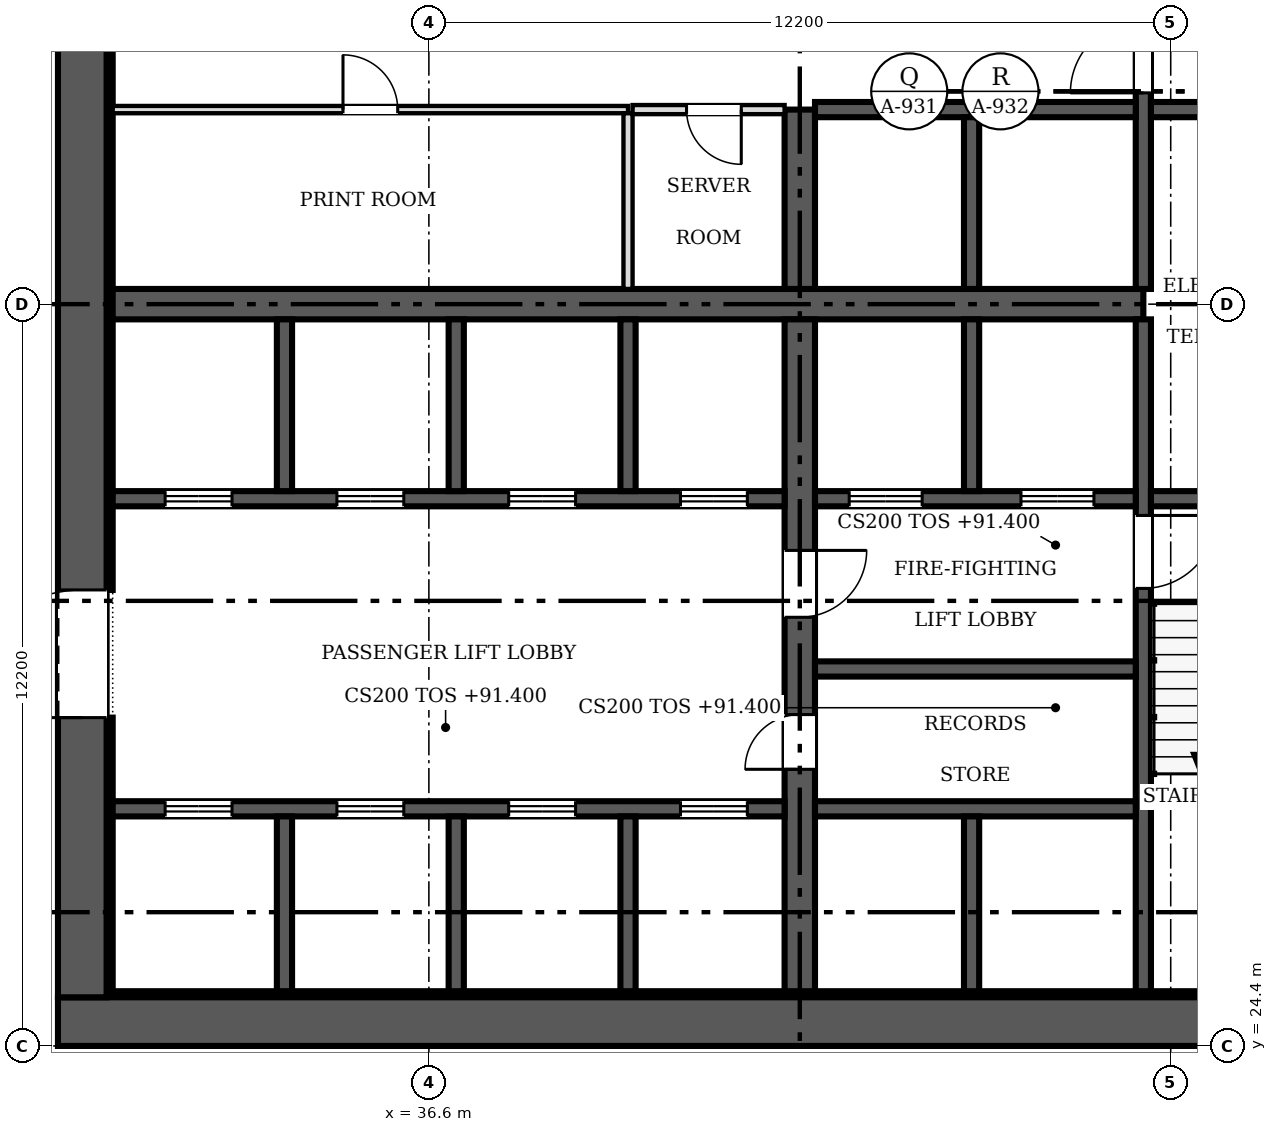
"""IFC4 building model, lengths in metres.
Left out: names, types, materials, properties, quantities, classifications, styles, units other than length and angle.
Written with IfcOpenShell. Run it as: python <this file> out.ifc"""

import sys

from ifc_helpers import new_model, si_unit, direction, frame, frame_2d, origin, place, context, subcontext, project, spatial, rectangle, extrude, source, transform, mapped, element, fill, save


model = new_model("IFC4")
c1 = context("Model", 3, precision=1e-05, world=origin(), true_north=direction((0.0, 1.0)))
c2 = subcontext(c1, "Body", "Model", "MODEL_VIEW")
j1 = project(units=[si_unit("LENGTHUNIT", "METRE"), si_unit("PLANEANGLEUNIT", "RADIAN")], contexts=[c1])
p1 = place(None, origin())
s1 = spatial("IfcSite", under=j1, at=p1, CompositionType="ELEMENT")
p2 = place(p1, origin())
s2 = spatial("IfcBuilding", under=s1, at=p2, CompositionType="ELEMENT")
p3 = place(p2, frame((0.0, 0.0, 91.4)))
s3 = spatial("IfcBuildingStorey", under=s2, at=p3, CompositionType="ELEMENT", Elevation=91.4)
p4 = place(p3, frame((54.9, 24.8, 0.0), z_axis=(0.0, 0.0, 1.0), x_axis=(-1.0, 0.0, 0.0)))
e1 = element("IfcWall", 1, at=p4, inside=s3, PredefinedType="SHEAR", context=c2, shape_type="SweptSolid", body=[
    extrude(rectangle(XDim=24.4, YDim=0.8, at=frame_2d((12.2, 0.0))), origin(), (0.0, 0.0, 1.0), 3.8),
])
m1 = source(origin(), c2, "Body", "SweptSolid", [
    extrude(rectangle(XDim=1.2, YDim=2.1, at=frame_2d((0.6, 1.05))), frame((0.0, 0.41, 0.0), z_axis=(0.0, -1.0, 0.0), x_axis=(1.0, 0.0, 0.0)), (0.0, 0.0, 1.0), 0.82),
])
p5 = place(p4, frame((1.5, 0.0, 0.0)))
e2 = element("IfcOpeningElement", 2, at=p5, cuts=e1, PredefinedType="OPENING", context=c2, shape_type="MappedRepresentation", body=[
    mapped(m1, transform((0.0, 0.0, 0.0), scale=1.0)),
])
p6 = place(p3, frame((30.9, 25.2, 0.0), z_axis=(0.0, 0.0, 1.0), x_axis=(0.0, 1.0, 0.0)))
e3 = element("IfcWall", 3, at=p6, inside=s3, PredefinedType="SHEAR", context=c2, shape_type="SweptSolid", body=[
    extrude(rectangle(XDim=22.8, YDim=0.8, at=frame_2d((11.4, 0.0))), origin(), (0.0, 0.0, 1.0), 3.8),
])
m2 = source(origin(), c2, "Body", "SweptSolid", [
    extrude(rectangle(XDim=2.1, YDim=2.4, at=frame_2d((1.05, 1.2))), frame((0.0, 0.41, 0.0), z_axis=(0.0, -1.0, 0.0), x_axis=(1.0, 0.0, 0.0)), (0.0, 0.0, 1.0), 0.82),
])
p7 = place(p6, frame((4.6, 0.0, 0.0)))
e4 = element("IfcOpeningElement", 4, at=p7, cuts=e3, PredefinedType="OPENING", context=c2, shape_type="MappedRepresentation", body=[
    mapped(m2, transform((0.0, 0.0, 0.0), scale=1.0)),
])
p8 = place(p6, frame((16.1, 0.0, 0.0)))
e5 = element("IfcOpeningElement", 5, at=p8, cuts=e3, PredefinedType="OPENING", context=c2, shape_type="MappedRepresentation", body=[
    mapped(m2, transform((0.0, 0.0, 0.0), scale=1.0)),
])
p9 = place(p3, frame((31.3, 25.25, 0.0), z_axis=(0.0, 0.0, 1.0), x_axis=(1.0, 0.0, 0.0)))
e6 = element("IfcWall", 6, at=p9, inside=s3, PredefinedType="SOLIDWALL", context=c2, shape_type="SweptSolid", body=[
    extrude(rectangle(XDim=20.9, YDim=0.1, at=frame_2d((10.45, 0.0))), origin(), (0.0, 0.0, 1.0), 3.8),
])
p10 = place(p3, frame((31.35, 25.3, 0.0), z_axis=(0.0, 0.0, 1.0), x_axis=(0.0, 1.0, 0.0)))
e7 = element("IfcWall", 7, at=p10, inside=s3, PredefinedType="SOLIDWALL", context=c2, shape_type="SweptSolid", body=[
    extrude(rectangle(XDim=4.5, YDim=0.1, at=frame_2d((2.25, 0.0))), origin(), (0.0, 0.0, 1.0), 3.8),
])
p11 = place(p3, frame((31.35, 31.9, 0.0), z_axis=(0.0, 0.0, 1.0), x_axis=(0.0, 1.0, 0.0)))
e8 = element("IfcWall", 8, at=p11, inside=s3, PredefinedType="SOLIDWALL", context=c2, shape_type="SweptSolid", body=[
    extrude(rectangle(XDim=9.4, YDim=0.1, at=frame_2d((4.7, 0.0))), origin(), (0.0, 0.0, 1.0), 3.8),
])
p12 = place(p3, frame((31.4, 36.6, 0.0), z_axis=(0.0, 0.0, 1.0), x_axis=(1.0, 0.0, 0.0)))
e9 = element("IfcWall", 9, at=p12, inside=s3, PredefinedType="SHEAR", context=c2, shape_type="SweptSolid", body=[
    extrude(rectangle(XDim=16.95, YDim=0.5, at=frame_2d((8.475, 0.0))), origin(), (0.0, 0.0, 1.0), 3.8),
])
p13 = place(p3, frame((42.7, 36.35, 0.0), z_axis=(0.0, 0.0, 1.0), x_axis=(0.0, -1.0, 0.0)))
e10 = element("IfcWall", 10, at=p13, inside=s3, PredefinedType="SHEAR", context=c2, shape_type="SweptSolid", body=[
    extrude(rectangle(XDim=11.05, YDim=0.5, at=frame_2d((5.525, 0.0))), origin(), (0.0, 0.0, 1.0), 3.8),
])
m3 = source(origin(), c2, "Body", "SweptSolid", [
    extrude(rectangle(XDim=0.9, YDim=2.1, at=frame_2d((0.45, 1.05))), frame((0.0, 0.26, 0.0), z_axis=(0.0, -1.0, 0.0), x_axis=(1.0, 0.0, 0.0)), (0.0, 0.0, 1.0), 0.52),
])
p14 = place(p13, frame((6.5, 0.0, 0.0)))
e11 = element("IfcOpeningElement", 11, at=p14, cuts=e10, PredefinedType="OPENING", context=c2, shape_type="MappedRepresentation", body=[
    mapped(m3, transform((0.0, 0.0, 0.0), scale=1.0)),
])
m4 = source(origin(), c2, "Body", "SweptSolid", [
    extrude(rectangle(XDim=1.1, YDim=2.1, at=frame_2d((0.55, 1.05))), frame((0.0, 0.26, 0.0), z_axis=(0.0, -1.0, 0.0), x_axis=(1.0, 0.0, 0.0)), (0.0, 0.0, 1.0), 0.52),
])
p15 = place(p13, frame((3.8, 0.0, 0.0)))
e12 = element("IfcOpeningElement", 12, at=p15, cuts=e10, PredefinedType="OPENING", context=c2, shape_type="MappedRepresentation", body=[
    mapped(m4, transform((0.0, 0.0, 0.0), scale=1.0)),
])
p16 = place(p3, frame((42.7, 36.85, 0.0), z_axis=(0.0, 0.0, 1.0), x_axis=(0.0, 1.0, 0.0)))
e13 = element("IfcWall", 13, at=p16, inside=s3, PredefinedType="SHEAR", context=c2, shape_type="SweptSolid", body=[
    extrude(rectangle(XDim=2.95, YDim=0.5, at=frame_2d((1.475, 0.0))), origin(), (0.0, 0.0, 1.0), 3.8),
])
p17 = place(p3, frame((48.35, 36.35, 0.0), z_axis=(0.0, 0.0, 1.0), x_axis=(0.0, -1.0, 0.0)))
e14 = element("IfcWall", 14, at=p17, inside=s3, PredefinedType="SOLIDWALL", context=c2, shape_type="SweptSolid", body=[
    extrude(rectangle(XDim=11.05, YDim=0.25, at=frame_2d((5.525, 0.0))), origin(), (0.0, 0.0, 1.0), 3.8),
])
m5 = source(origin(), c2, "Body", "SweptSolid", [
    extrude(rectangle(XDim=1.2, YDim=2.1, at=frame_2d((0.6, 1.05))), frame((0.0, 0.135, 0.0), z_axis=(0.0, -1.0, 0.0), x_axis=(1.0, 0.0, 0.0)), (0.0, 0.0, 1.0), 0.27),
])
p18 = place(p17, frame((3.225, 0.0, 0.0)))
e15 = element("IfcOpeningElement", 15, at=p18, cuts=e14, PredefinedType="OPENING", context=c2, shape_type="MappedRepresentation", body=[
    mapped(m5, transform((0.0, 0.0, 0.0), scale=1.0)),
])
p19 = place(p3, frame((48.35, 47.9, 0.0), z_axis=(0.0, 0.0, 1.0), x_axis=(0.0, -1.0, 0.0)))
e16 = element("IfcWall", 16, at=p19, inside=s3, PredefinedType="SOLIDWALL", context=c2, shape_type="SweptSolid", body=[
    extrude(rectangle(XDim=11.05, YDim=0.25, at=frame_2d((5.525, 0.0))), origin(), (0.0, 0.0, 1.0), 3.8),
])
p20 = place(p19, frame((6.625, 0.0, 0.0)))
e17 = element("IfcOpeningElement", 17, at=p20, cuts=e16, PredefinedType="OPENING", context=c2, shape_type="MappedRepresentation", body=[
    mapped(m5, transform((0.0, 0.0, 0.0), scale=1.0)),
])
p21 = place(p3, frame((42.45, 33.4, 0.0), z_axis=(0.0, 0.0, 1.0), x_axis=(-1.0, 0.0, 0.0)))
e18 = element("IfcWall", 18, at=p21, inside=s3, PredefinedType="SOLIDWALL", context=c2, shape_type="SweptSolid", body=[
    extrude(rectangle(XDim=11.05, YDim=0.25, at=frame_2d((5.525, 0.0))), origin(), (0.0, 0.0, 1.0), 3.8),
])
m6 = source(origin(), c2, "Body", "SweptSolid", [
    extrude(rectangle(XDim=1.1, YDim=2.1, at=frame_2d((0.55, 1.05))), frame((0.0, 0.135, 0.0), z_axis=(0.0, -1.0, 0.0), x_axis=(1.0, 0.0, 0.0)), (0.0, 0.0, 1.0), 0.27),
])
p22 = place(p21, frame((9.087, 0.0, 0.0)))
e19 = element("IfcOpeningElement", 19, at=p22, cuts=e18, PredefinedType="OPENING", context=c2, shape_type="MappedRepresentation", body=[
    mapped(m6, transform((0.0, 0.0, 0.0), scale=1.0)),
])
p23 = place(p21, frame((6.262, 0.0, 0.0)))
e20 = element("IfcOpeningElement", 20, at=p23, cuts=e18, PredefinedType="OPENING", context=c2, shape_type="MappedRepresentation", body=[
    mapped(m6, transform((0.0, 0.0, 0.0), scale=1.0)),
])
p24 = place(p21, frame((3.438, 0.0, 0.0)))
e21 = element("IfcOpeningElement", 21, at=p24, cuts=e18, PredefinedType="OPENING", context=c2, shape_type="MappedRepresentation", body=[
    mapped(m6, transform((0.0, 0.0, 0.0), scale=1.0)),
])
p25 = place(p21, frame((0.613, 0.0, 0.0)))
e22 = element("IfcOpeningElement", 22, at=p25, cuts=e18, PredefinedType="OPENING", context=c2, shape_type="MappedRepresentation", body=[
    mapped(m6, transform((0.0, 0.0, 0.0), scale=1.0)),
])
p26 = place(p3, frame((48.225, 33.4, 0.0), z_axis=(0.0, 0.0, 1.0), x_axis=(-1.0, 0.0, 0.0)))
e23 = element("IfcWall", 23, at=p26, inside=s3, PredefinedType="SOLIDWALL", context=c2, shape_type="SweptSolid", body=[
    extrude(rectangle(XDim=5.275, YDim=0.25, at=frame_2d((2.638, 0.0))), origin(), (0.0, 0.0, 1.0), 3.8),
])
p27 = place(p26, frame((3.512, 0.0, 0.0)))
e24 = element("IfcOpeningElement", 24, at=p27, cuts=e23, PredefinedType="OPENING", context=c2, shape_type="MappedRepresentation", body=[
    mapped(m5, transform((0.0, 0.0, 0.0), scale=1.0)),
])
p28 = place(p26, frame((0.688, 0.0, 0.0)))
e25 = element("IfcOpeningElement", 25, at=p28, cuts=e23, PredefinedType="OPENING", context=c2, shape_type="MappedRepresentation", body=[
    mapped(m5, transform((0.0, 0.0, 0.0), scale=1.0)),
])
p29 = place(p3, frame((48.475, 33.4, 0.0), z_axis=(0.0, 0.0, 1.0), x_axis=(1.0, 0.0, 0.0)))
e26 = element("IfcWall", 26, at=p29, inside=s3, PredefinedType="SOLIDWALL", context=c2, shape_type="SweptSolid", body=[
    extrude(rectangle(XDim=3.525, YDim=0.25, at=frame_2d((1.762, 0.0))), origin(), (0.0, 0.0, 1.0), 3.8),
])
p30 = place(p3, frame((31.4, 28.3, 0.0), z_axis=(0.0, 0.0, 1.0), x_axis=(1.0, 0.0, 0.0)))
e27 = element("IfcWall", 27, at=p30, inside=s3, PredefinedType="SOLIDWALL", context=c2, shape_type="SweptSolid", body=[
    extrude(rectangle(XDim=11.05, YDim=0.25, at=frame_2d((5.525, 0.0))), origin(), (0.0, 0.0, 1.0), 3.8),
])
p31 = place(p30, frame((0.863, 0.0, 0.0)))
e28 = element("IfcOpeningElement", 28, at=p31, cuts=e27, PredefinedType="OPENING", context=c2, shape_type="MappedRepresentation", body=[
    mapped(m6, transform((0.0, 0.0, 0.0), scale=1.0)),
])
p32 = place(p30, frame((3.688, 0.0, 0.0)))
e29 = element("IfcOpeningElement", 29, at=p32, cuts=e27, PredefinedType="OPENING", context=c2, shape_type="MappedRepresentation", body=[
    mapped(m6, transform((0.0, 0.0, 0.0), scale=1.0)),
])
p33 = place(p30, frame((6.512, 0.0, 0.0)))
e30 = element("IfcOpeningElement", 30, at=p33, cuts=e27, PredefinedType="OPENING", context=c2, shape_type="MappedRepresentation", body=[
    mapped(m6, transform((0.0, 0.0, 0.0), scale=1.0)),
])
p34 = place(p30, frame((9.337, 0.0, 0.0)))
e31 = element("IfcOpeningElement", 31, at=p34, cuts=e27, PredefinedType="OPENING", context=c2, shape_type="MappedRepresentation", body=[
    mapped(m6, transform((0.0, 0.0, 0.0), scale=1.0)),
])
for number, where, z_axis, x_axis in (
    (32, (42.95, 28.3, 0.0), (0.0, 0.0, 1.0), (1.0, 0.0, 0.0)),
    (33, (42.95, 39.8, 0.0), (0.0, 0.0, 1.0), (1.0, 0.0, 0.0)),
):
    element("IfcWall", number, at=place(p3, frame(where, z_axis=z_axis, x_axis=x_axis)), inside=s3, PredefinedType="SOLIDWALL", context=c2, shape_type="SweptSolid", body=[
        extrude(rectangle(XDim=5.275, YDim=0.25, at=frame_2d((2.638, 0.0))), origin(), (0.0, 0.0, 1.0), 3.8),
    ])
p35 = place(p3, frame((48.475, 39.8, 0.0), z_axis=(0.0, 0.0, 1.0), x_axis=(1.0, 0.0, 0.0)))
e34 = element("IfcWall", 34, at=p35, inside=s3, PredefinedType="SOLIDWALL", context=c2, shape_type="SweptSolid", body=[
    extrude(rectangle(XDim=3.525, YDim=0.25, at=frame_2d((1.762, 0.0))), origin(), (0.0, 0.0, 1.0), 3.8),
])
p36 = place(p3, frame((45.525, 33.525, 0.0), z_axis=(0.0, 0.0, 1.0), x_axis=(0.0, 1.0, 0.0)))
e35 = element("IfcWall", 35, at=p36, inside=s3, PredefinedType="SOLIDWALL", context=c2, shape_type="SweptSolid", body=[
    extrude(rectangle(XDim=2.825, YDim=0.25, at=frame_2d((1.413, 0.0))), origin(), (0.0, 0.0, 1.0), 3.8),
])
p37 = place(p3, frame((45.525, 36.85, 0.0), z_axis=(0.0, 0.0, 1.0), x_axis=(0.0, 1.0, 0.0)))
e36 = element("IfcWall", 36, at=p37, inside=s3, PredefinedType="SOLIDWALL", context=c2, shape_type="SweptSolid", body=[
    extrude(rectangle(XDim=2.825, YDim=0.25, at=frame_2d((1.413, 0.0))), origin(), (0.0, 0.0, 1.0), 3.8),
])
p38 = place(p3, frame((42.95, 30.6, 0.0), z_axis=(0.0, 0.0, 1.0), x_axis=(1.0, 0.0, 0.0)))
e37 = element("IfcWall", 37, at=p38, inside=s3, PredefinedType="SOLIDWALL", context=c2, shape_type="SweptSolid", body=[
    extrude(rectangle(XDim=5.275, YDim=0.25, at=frame_2d((2.638, 0.0))), origin(), (0.0, 0.0, 1.0), 3.8),
])
for number, where, z_axis, x_axis in (
    (38, (34.225, 33.525, 0.0), (0.0, 0.0, 1.0), (0.0, 1.0, 0.0)),
    (39, (37.05, 33.525, 0.0), (0.0, 0.0, 1.0), (0.0, 1.0, 0.0)),
    (40, (39.875, 33.525, 0.0), (0.0, 0.0, 1.0), (0.0, 1.0, 0.0)),
):
    element("IfcWall", number, at=place(p3, frame(where, z_axis=z_axis, x_axis=x_axis)), inside=s3, PredefinedType="SOLIDWALL", context=c2, shape_type="SweptSolid", body=[
        extrude(rectangle(XDim=2.825, YDim=0.25, at=frame_2d((1.413, 0.0))), origin(), (0.0, 0.0, 1.0), 3.8),
    ])
for number, where, z_axis, x_axis in (
    (41, (34.225, 25.3, 0.0), (0.0, 0.0, 1.0), (0.0, 1.0, 0.0)),
    (42, (37.05, 25.3, 0.0), (0.0, 0.0, 1.0), (0.0, 1.0, 0.0)),
    (43, (39.875, 25.3, 0.0), (0.0, 0.0, 1.0), (0.0, 1.0, 0.0)),
    (44, (45.525, 25.3, 0.0), (0.0, 0.0, 1.0), (0.0, 1.0, 0.0)),
):
    element("IfcWall", number, at=place(p3, frame(where, z_axis=z_axis, x_axis=x_axis)), inside=s3, PredefinedType="SOLIDWALL", context=c2, shape_type="SweptSolid", body=[
        extrude(rectangle(XDim=2.875, YDim=0.25, at=frame_2d((1.438, 0.0))), origin(), (0.0, 0.0, 1.0), 3.8),
    ])
p39 = place(p3, frame((39.875, 39.8, 0.0), z_axis=(0.0, 0.0, 1.0), x_axis=(-1.0, 0.0, 0.0)))
e45 = element("IfcWall", 45, at=p39, inside=s3, PredefinedType="PARTITIONING", context=c2, shape_type="SweptSolid", body=[
    extrude(rectangle(XDim=8.475, YDim=0.12, at=frame_2d((4.238, 0.0))), origin(), (0.0, 0.0, 1.0), 3.6),
])
m7 = source(origin(), c2, "Body", "SweptSolid", [
    extrude(rectangle(XDim=0.9, YDim=2.1, at=frame_2d((0.45, 1.05))), frame((0.0, 0.07, 0.0), z_axis=(0.0, -1.0, 0.0), x_axis=(1.0, 0.0, 0.0)), (0.0, 0.0, 1.0), 0.14),
])
p40 = place(p39, frame((3.788, 0.0, 0.0)))
e46 = element("IfcOpeningElement", 46, at=p40, cuts=e45, PredefinedType="OPENING", context=c2, shape_type="MappedRepresentation", body=[
    mapped(m7, transform((0.0, 0.0, 0.0), scale=1.0)),
])
p41 = place(p3, frame((39.875, 36.85, 0.0), z_axis=(0.0, 0.0, 1.0), x_axis=(0.0, 1.0, 0.0)))
e47 = element("IfcWall", 47, at=p41, inside=s3, PredefinedType="PARTITIONING", context=c2, shape_type="SweptSolid", body=[
    extrude(rectangle(XDim=2.89, YDim=0.15, at=frame_2d((1.445, 0.0))), origin(), (0.0, 0.0, 1.0), 3.6),
])
p42 = place(p3, frame((42.45, 39.8, 0.0), z_axis=(0.0, 0.0, 1.0), x_axis=(-1.0, 0.0, 0.0)))
e48 = element("IfcWall", 48, at=p42, inside=s3, PredefinedType="PARTITIONING", context=c2, shape_type="SweptSolid", body=[
    extrude(rectangle(XDim=2.5, YDim=0.15, at=frame_2d((1.25, 0.0))), origin(), (0.0, 0.0, 1.0), 3.6),
])
m8 = source(origin(), c2, "Body", "SweptSolid", [
    extrude(rectangle(XDim=0.9, YDim=2.1, at=frame_2d((0.45, 1.05))), frame((0.0, 0.085, 0.0), z_axis=(0.0, -1.0, 0.0), x_axis=(1.0, 0.0, 0.0)), (0.0, 0.0, 1.0), 0.17),
])
p43 = place(p42, frame((0.712, 0.0, 0.0)))
e49 = element("IfcOpeningElement", 49, at=p43, cuts=e48, PredefinedType="OPENING", context=c2, shape_type="MappedRepresentation", body=[
    mapped(m8, transform((0.0, 0.0, 0.0), scale=1.0)),
])
m9 = source(origin(), c2, "Body", "SweptSolid", [
    extrude(rectangle(XDim=2.1, YDim=2.4, at=frame_2d((1.05, 1.2))), frame((0.0, 0.025, 0.0), z_axis=(0.0, -1.0, 0.0), x_axis=(1.0, 0.0, 0.0)), (0.0, 0.0, 1.0), 0.05),
])
p44 = place(p7, origin())
e50 = element("IfcDoor", 50, at=p44, inside=s3, OperationType="DOUBLE_DOOR_SINGLE_SWING", PredefinedType="DOOR", context=c2, shape_type="MappedRepresentation", body=[
    mapped(m9, transform((0.0, 0.0, 0.0), scale=1.0)),
])
fill(e4, e50)
m10 = source(origin(), c2, "Body", "SweptSolid", [
    extrude(rectangle(XDim=0.9, YDim=2.1, at=frame_2d((0.45, 1.05))), frame((0.0, 0.025, 0.0), z_axis=(0.0, -1.0, 0.0), x_axis=(1.0, 0.0, 0.0)), (0.0, 0.0, 1.0), 0.05),
])
p45 = place(p14, origin())
e51 = element("IfcDoor", 51, at=p45, inside=s3, OperationType="SINGLE_SWING_RIGHT", PredefinedType="DOOR", context=c2, shape_type="MappedRepresentation", body=[
    mapped(m10, transform((0.0, 0.0, 0.0), scale=1.0)),
])
fill(e11, e51)
m11 = source(origin(), c2, "Body", "SweptSolid", [
    extrude(rectangle(XDim=1.1, YDim=2.1, at=frame_2d((0.55, 1.05))), frame((0.0, 0.025, 0.0), z_axis=(0.0, -1.0, 0.0), x_axis=(1.0, 0.0, 0.0)), (0.0, 0.0, 1.0), 0.05),
])
p46 = place(p15, origin())
e52 = element("IfcDoor", 52, at=p46, inside=s3, OperationType="SINGLE_SWING_LEFT", PredefinedType="DOOR", context=c2, shape_type="MappedRepresentation", body=[
    mapped(m11, transform((0.0, 0.0, 0.0), scale=1.0)),
])
fill(e12, e52)
m12 = source(origin(), c2, "Body", "SweptSolid", [
    extrude(rectangle(XDim=1.2, YDim=2.1, at=frame_2d((0.6, 1.05))), frame((0.0, 0.025, 0.0), z_axis=(0.0, -1.0, 0.0), x_axis=(1.0, 0.0, 0.0)), (0.0, 0.0, 1.0), 0.05),
])
p47 = place(p18, origin())
e53 = element("IfcDoor", 53, at=p47, inside=s3, OperationType="SINGLE_SWING_LEFT", PredefinedType="DOOR", context=c2, shape_type="MappedRepresentation", body=[
    mapped(m12, transform((0.0, 0.0, 0.0), scale=1.0)),
])
fill(e15, e53)
p48 = place(p20, origin())
e54 = element("IfcDoor", 54, at=p48, inside=s3, OperationType="SINGLE_SWING_RIGHT", PredefinedType="DOOR", context=c2, shape_type="MappedRepresentation", body=[
    mapped(m12, transform((0.0, 0.0, 0.0), scale=1.0)),
])
fill(e17, e54)
p49 = place(p22, origin())
e55 = element("IfcDoor", 55, at=p49, inside=s3, OperationType="DOUBLE_DOOR_SLIDING", PredefinedType="DOOR", context=c2, shape_type="MappedRepresentation", body=[
    mapped(m11, transform((0.0, 0.0, 0.0), scale=1.0)),
])
fill(e19, e55)
p50 = place(p23, origin())
e56 = element("IfcDoor", 56, at=p50, inside=s3, OperationType="DOUBLE_DOOR_SLIDING", PredefinedType="DOOR", context=c2, shape_type="MappedRepresentation", body=[
    mapped(m11, transform((0.0, 0.0, 0.0), scale=1.0)),
])
fill(e20, e56)
p51 = place(p24, origin())
e57 = element("IfcDoor", 57, at=p51, inside=s3, OperationType="DOUBLE_DOOR_SLIDING", PredefinedType="DOOR", context=c2, shape_type="MappedRepresentation", body=[
    mapped(m11, transform((0.0, 0.0, 0.0), scale=1.0)),
])
fill(e21, e57)
p52 = place(p25, origin())
e58 = element("IfcDoor", 58, at=p52, inside=s3, OperationType="DOUBLE_DOOR_SLIDING", PredefinedType="DOOR", context=c2, shape_type="MappedRepresentation", body=[
    mapped(m11, transform((0.0, 0.0, 0.0), scale=1.0)),
])
fill(e22, e58)
p53 = place(p27, origin())
e59 = element("IfcDoor", 59, at=p53, inside=s3, OperationType="DOUBLE_DOOR_SLIDING", PredefinedType="DOOR", context=c2, shape_type="MappedRepresentation", body=[
    mapped(m12, transform((0.0, 0.0, 0.0), scale=1.0)),
])
fill(e24, e59)
p54 = place(p28, origin())
e60 = element("IfcDoor", 60, at=p54, inside=s3, OperationType="DOUBLE_DOOR_SLIDING", PredefinedType="DOOR", context=c2, shape_type="MappedRepresentation", body=[
    mapped(m12, transform((0.0, 0.0, 0.0), scale=1.0)),
])
fill(e25, e60)
p55 = place(p31, origin())
e61 = element("IfcDoor", 61, at=p55, inside=s3, OperationType="DOUBLE_DOOR_SLIDING", PredefinedType="DOOR", context=c2, shape_type="MappedRepresentation", body=[
    mapped(m11, transform((0.0, 0.0, 0.0), scale=1.0)),
])
fill(e28, e61)
p56 = place(p32, origin())
e62 = element("IfcDoor", 62, at=p56, inside=s3, OperationType="DOUBLE_DOOR_SLIDING", PredefinedType="DOOR", context=c2, shape_type="MappedRepresentation", body=[
    mapped(m11, transform((0.0, 0.0, 0.0), scale=1.0)),
])
fill(e29, e62)
p57 = place(p33, origin())
e63 = element("IfcDoor", 63, at=p57, inside=s3, OperationType="DOUBLE_DOOR_SLIDING", PredefinedType="DOOR", context=c2, shape_type="MappedRepresentation", body=[
    mapped(m11, transform((0.0, 0.0, 0.0), scale=1.0)),
])
fill(e30, e63)
p58 = place(p34, origin())
e64 = element("IfcDoor", 64, at=p58, inside=s3, OperationType="DOUBLE_DOOR_SLIDING", PredefinedType="DOOR", context=c2, shape_type="MappedRepresentation", body=[
    mapped(m11, transform((0.0, 0.0, 0.0), scale=1.0)),
])
fill(e31, e64)
p59 = place(p40, origin())
e65 = element("IfcDoor", 65, at=p59, inside=s3, OperationType="SINGLE_SWING_RIGHT", PredefinedType="DOOR", context=c2, shape_type="MappedRepresentation", body=[
    mapped(m10, transform((0.0, 0.0, 0.0), scale=1.0)),
])
fill(e46, e65)
p60 = place(p43, origin())
e66 = element("IfcDoor", 66, at=p60, inside=s3, OperationType="SINGLE_SWING_LEFT", PredefinedType="DOOR", context=c2, shape_type="MappedRepresentation", body=[
    mapped(m10, transform((0.0, 0.0, 0.0), scale=1.0)),
])
fill(e49, e66)
save(model, sys.argv[1])
